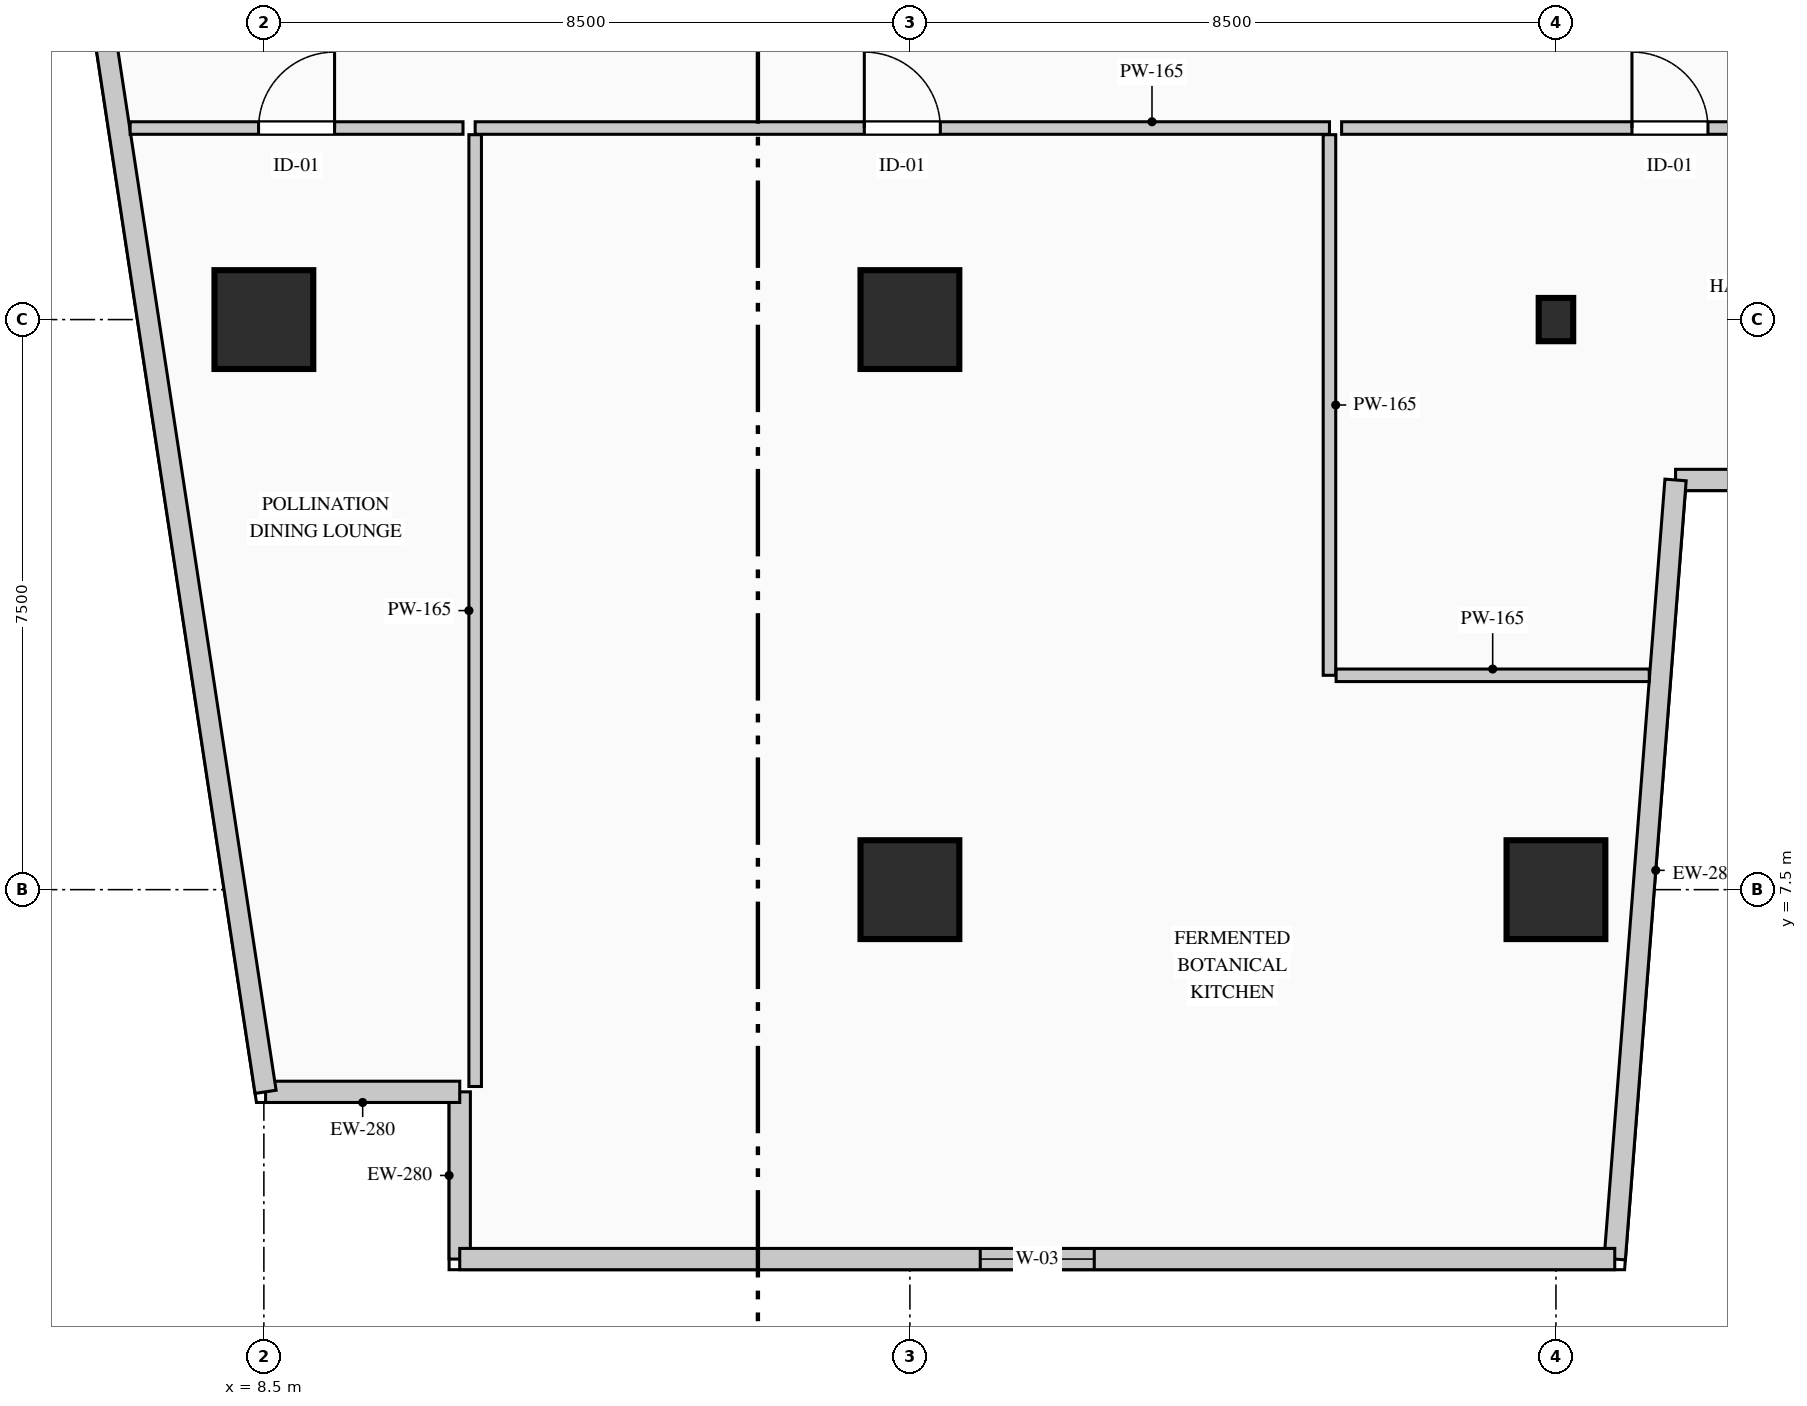
"""IFC4 building model, lengths in metres.
Left out: names, types, materials, properties, quantities, classifications, styles, units other than length and angle.
Written with IfcOpenShell. Run it as: python <this file> out.ifc"""

import sys

from ifc_helpers import new_model, si_unit, direction, frame, frame_2d, origin, origin_2d, place, context, subcontext, project, spatial, rectangle, i_section, extrude, element, fill, save


model = new_model("IFC4")
c1 = context("Model", 3, precision=1e-05, world=origin(), true_north=direction((0.0, 1.0)))
c2 = subcontext(c1, "Body", "Model", "MODEL_VIEW")
j1 = project(units=[si_unit("LENGTHUNIT", "METRE"), si_unit("PLANEANGLEUNIT", "RADIAN")], contexts=[c1])
p1 = place(None, origin())
s1 = spatial("IfcSite", under=j1, at=p1, CompositionType="ELEMENT")
p2 = place(p1, origin())
s2 = spatial("IfcBuilding", under=s1, at=p2, CompositionType="ELEMENT")
p3 = place(p2, frame((0.0, 0.0, 62.2)))
s3 = spatial("IfcBuildingStorey", under=s2, at=p3, CompositionType="ELEMENT", Elevation=62.2)
for number, where, z_axis, x_axis in (
    (1, (8.5, 15.0, 0.0), (0.0, 0.0, 1.0), (1.0, 0.0, 0.0)),
    (2, (17.0, 7.5, 0.0), (0.0, 0.0, 1.0), (1.0, 0.0, 0.0)),
    (3, (17.0, 15.0, 0.0), (0.0, 0.0, 1.0), (1.0, 0.0, 0.0)),
    (4, (25.5, 7.5, 0.0), (0.0, 0.0, 1.0), (1.0, 0.0, 0.0)),
):
    element("IfcColumn", number, at=place(p3, frame(where, z_axis=z_axis, x_axis=x_axis)), inside=s3, PredefinedType="COLUMN", context=c2, shape_type="SweptSolid", body=[
        extrude(rectangle(XDim=1.3, YDim=1.3, at=origin_2d()), origin(), (0.0, 0.0, 1.0), 4.4),
    ])
p4 = place(p3, frame((25.5, 15.0, 0.0), z_axis=(0.0, 0.0, 1.0), x_axis=(1.0, 0.0, 0.0)))
e5 = element("IfcColumn", 5, at=p4, inside=s3, PredefinedType="COLUMN", context=c2, shape_type="SweptSolid", body=[
    extrude(i_section(OverallWidth=0.454, OverallDepth=0.569, WebThickness=0.078, FlangeThickness=0.08, FilletRadius=0.015, at=origin_2d()), origin(), (0.0, 0.0, 1.0), 4.4),
])
p5 = place(p3, frame((11.077, 2.64, 0.0), z_axis=(0.0, 0.0, 1.0), x_axis=(0.0, 1.0, 0.0)))
e6 = element("IfcWall", 6, at=p5, inside=s3, PredefinedType="STANDARD", context=c2, shape_type="SweptSolid", body=[
    extrude(rectangle(XDim=2.2, YDim=0.28, at=frame_2d((1.1, 0.0))), origin(), (0.0, 0.0, 1.0), 4.1),
])
p6 = place(p3, frame((11.077, 4.84, 0.0), z_axis=(0.0, 0.0, 1.0), x_axis=(-1.0, 0.0, 0.0)))
e7 = element("IfcWall", 7, at=p6, inside=s3, PredefinedType="STANDARD", context=c2, shape_type="SweptSolid", body=[
    extrude(rectangle(XDim=2.554, YDim=0.28, at=frame_2d((1.277, 0.0))), origin(), (0.0, 0.0, 1.0), 4.1),
])
p7 = place(p3, frame((8.523, 4.84, 0.0), z_axis=(0.0, 0.0, 1.0), x_axis=(-0.150394554312, 0.988626055712, 0.0)))
e8 = element("IfcWall", 8, at=p7, inside=s3, PredefinedType="STANDARD", context=c2, shape_type="SweptSolid", body=[
    extrude(rectangle(XDim=36.738, YDim=0.28, at=frame_2d((18.369, 0.0))), origin(), (0.0, 0.0, 1.0), 4.1),
])
p8 = place(p7, frame((22.762, 0.0, 0.9)))
e9 = element("IfcOpeningElement", 9, at=p8, cuts=e8, PredefinedType="OPENING", context=c2, shape_type="SweptSolid", body=[
    extrude(rectangle(XDim=1.5, YDim=1.8, at=frame_2d((0.75, 0.9))), frame((0.0, 0.15, 0.0), z_axis=(0.0, -1.0, 0.0), x_axis=(1.0, 0.0, 0.0)), (0.0, 0.0, 1.0), 0.3),
])
p9 = place(p3, frame((35.77, 12.89, 0.0), z_axis=(0.0, 0.0, 1.0), x_axis=(-1.0, 0.0, 0.0)))
e10 = element("IfcWall", 10, at=p9, inside=s3, PredefinedType="STANDARD", context=c2, shape_type="SweptSolid", body=[
    extrude(rectangle(XDim=8.697, YDim=0.28, at=frame_2d((4.348, 0.0))), origin(), (0.0, 0.0, 1.0), 4.1),
])
p10 = place(p9, frame((5.511, 0.0, 0.9)))
e11 = element("IfcOpeningElement", 11, at=p10, cuts=e10, PredefinedType="OPENING", context=c2, shape_type="SweptSolid", body=[
    extrude(rectangle(XDim=1.5, YDim=1.8, at=frame_2d((0.75, 0.9))), frame((0.0, 0.15, 0.0), z_axis=(0.0, -1.0, 0.0), x_axis=(1.0, 0.0, 0.0)), (0.0, 0.0, 1.0), 0.3),
])
p11 = place(p3, frame((27.073, 12.89, 0.0), z_axis=(0.0, 0.0, 1.0), x_axis=(-0.077816860153, -0.996967670627, 0.0)))
e12 = element("IfcWall", 12, at=p11, inside=s3, PredefinedType="STANDARD", context=c2, shape_type="SweptSolid", body=[
    extrude(rectangle(XDim=10.281, YDim=0.28, at=frame_2d((5.141, 0.0))), origin(), (0.0, 0.0, 1.0), 4.1),
])
p12 = place(p3, frame((26.273, 2.64, 0.0), z_axis=(0.0, 0.0, 1.0), x_axis=(-1.0, 0.0, 0.0)))
e13 = element("IfcWall", 13, at=p12, inside=s3, PredefinedType="STANDARD", context=c2, shape_type="SweptSolid", body=[
    extrude(rectangle(XDim=15.197, YDim=0.28, at=frame_2d((7.598, 0.0))), origin(), (0.0, 0.0, 1.0), 4.1),
])
p13 = place(p12, frame((6.848, 0.0, 0.9)))
e14 = element("IfcOpeningElement", 14, at=p13, cuts=e13, PredefinedType="OPENING", context=c2, shape_type="SweptSolid", body=[
    extrude(rectangle(XDim=1.5, YDim=1.8, at=frame_2d((0.75, 0.9))), frame((0.0, 0.15, 0.0), z_axis=(0.0, -1.0, 0.0), x_axis=(1.0, 0.0, 0.0)), (0.0, 0.0, 1.0), 0.3),
])
p14 = place(p3, frame((11.28, 17.52, 0.0), z_axis=(0.0, 0.0, 1.0), x_axis=(1.0, 0.0, 0.0)))
e15 = element("IfcWall", 15, at=p14, inside=s3, PredefinedType="PARTITIONING", context=c2, shape_type="SweptSolid", body=[
    extrude(rectangle(XDim=11.24, YDim=0.165, at=frame_2d((5.62, 0.0))), origin(), (0.0, 0.0, 1.0), 4.1),
])
p15 = place(p14, frame((5.12, 0.0, 0.0)))
e16 = element("IfcOpeningElement", 16, at=p15, cuts=e15, PredefinedType="OPENING", context=c2, shape_type="SweptSolid", body=[
    extrude(rectangle(XDim=1.0, YDim=2.15, at=frame_2d((0.5, 1.075))), frame((0.0, 0.093, 0.0), z_axis=(0.0, -1.0, 0.0), x_axis=(1.0, 0.0, 0.0)), (0.0, 0.0, 1.0), 0.185),
])
p16 = place(p3, frame((22.52, 17.433, 0.0), z_axis=(0.0, 0.0, 1.0), x_axis=(0.0, -1.0, 0.0)))
e17 = element("IfcWall", 17, at=p16, inside=s3, PredefinedType="PARTITIONING", context=c2, shape_type="SweptSolid", body=[
    extrude(rectangle(XDim=7.113, YDim=0.165, at=frame_2d((3.556, 0.0))), origin(), (0.0, 0.0, 1.0), 3.685),
])
p17 = place(p3, frame((22.607, 10.32, 0.0), z_axis=(0.0, 0.0, 1.0), x_axis=(1.0, 0.0, 0.0)))
e18 = element("IfcWall", 18, at=p17, inside=s3, PredefinedType="PARTITIONING", context=c2, shape_type="SweptSolid", body=[
    extrude(rectangle(XDim=4.12, YDim=0.165, at=frame_2d((2.06, 0.0))), origin(), (0.0, 0.0, 1.0), 4.1),
])
p18 = place(p3, frame((11.28, 4.91, 0.0), z_axis=(0.0, 0.0, 1.0), x_axis=(0.0, 1.0, 0.0)))
e19 = element("IfcWall", 19, at=p18, inside=s3, PredefinedType="PARTITIONING", context=c2, shape_type="SweptSolid", body=[
    extrude(rectangle(XDim=12.522, YDim=0.165, at=frame_2d((6.261, 0.0))), origin(), (0.0, 0.0, 1.0), 4.1),
])
p19 = place(p3, frame((6.74, 17.52, 0.0), z_axis=(0.0, 0.0, 1.0), x_axis=(1.0, 0.0, 0.0)))
e20 = element("IfcWall", 20, at=p19, inside=s3, PredefinedType="PARTITIONING", context=c2, shape_type="SweptSolid", body=[
    extrude(rectangle(XDim=4.38, YDim=0.165, at=frame_2d((2.19, 0.0))), origin(), (0.0, 0.0, 1.0), 4.1),
])
p20 = place(p19, frame((1.69, 0.0, 0.0)))
e21 = element("IfcOpeningElement", 21, at=p20, cuts=e20, PredefinedType="OPENING", context=c2, shape_type="SweptSolid", body=[
    extrude(rectangle(XDim=1.0, YDim=2.15, at=frame_2d((0.5, 1.075))), frame((0.0, 0.093, 0.0), z_axis=(0.0, -1.0, 0.0), x_axis=(1.0, 0.0, 0.0)), (0.0, 0.0, 1.0), 0.185),
])
p21 = place(p3, frame((22.68, 17.52, 0.0), z_axis=(0.0, 0.0, 1.0), x_axis=(1.0, 0.0, 0.0)))
e22 = element("IfcWall", 22, at=p21, inside=s3, PredefinedType="PARTITIONING", context=c2, shape_type="SweptSolid", body=[
    extrude(rectangle(XDim=8.64, YDim=0.165, at=frame_2d((4.32, 0.0))), origin(), (0.0, 0.0, 1.0), 3.685),
])
p22 = place(p21, frame((3.82, 0.0, 0.0)))
e23 = element("IfcOpeningElement", 23, at=p22, cuts=e22, PredefinedType="OPENING", context=c2, shape_type="SweptSolid", body=[
    extrude(rectangle(XDim=1.0, YDim=2.15, at=frame_2d((0.5, 1.075))), frame((0.0, 0.093, 0.0), z_axis=(0.0, -1.0, 0.0), x_axis=(1.0, 0.0, 0.0)), (0.0, 0.0, 1.0), 0.185),
])
p23 = place(p13, origin())
e24 = element("IfcWindow", 24, at=p23, inside=s3, PartitioningType="SINGLE_PANEL", PredefinedType="WINDOW", context=c2, shape_type="SweptSolid", body=[
    extrude(rectangle(XDim=1.5, YDim=1.8, at=frame_2d((0.75, 0.9))), frame((0.0, 0.03, 0.0), z_axis=(0.0, -1.0, 0.0), x_axis=(1.0, 0.0, 0.0)), (0.0, 0.0, 1.0), 0.06),
])
fill(e14, e24)
p24 = place(p15, origin())
e25 = element("IfcDoor", 25, at=p24, inside=s3, OperationType="SINGLE_SWING_LEFT", PredefinedType="DOOR", context=c2, shape_type="SweptSolid", body=[
    extrude(rectangle(XDim=1.0, YDim=2.15, at=frame_2d((0.5, 1.075))), frame((0.0, 0.025, 0.0), z_axis=(0.0, -1.0, 0.0), x_axis=(1.0, 0.0, 0.0)), (0.0, 0.0, 1.0), 0.05),
])
fill(e16, e25)
p25 = place(p20, origin())
e26 = element("IfcDoor", 26, at=p25, inside=s3, OperationType="SINGLE_SWING_RIGHT", PredefinedType="DOOR", context=c2, shape_type="SweptSolid", body=[
    extrude(rectangle(XDim=1.0, YDim=2.15, at=frame_2d((0.5, 1.075))), frame((0.0, 0.025, 0.0), z_axis=(0.0, -1.0, 0.0), x_axis=(1.0, 0.0, 0.0)), (0.0, 0.0, 1.0), 0.05),
])
fill(e21, e26)
p26 = place(p22, origin())
e27 = element("IfcDoor", 27, at=p26, inside=s3, OperationType="SINGLE_SWING_LEFT", PredefinedType="DOOR", context=c2, shape_type="SweptSolid", body=[
    extrude(rectangle(XDim=1.0, YDim=2.15, at=frame_2d((0.5, 1.075))), frame((0.0, 0.025, 0.0), z_axis=(0.0, -1.0, 0.0), x_axis=(1.0, 0.0, 0.0)), (0.0, 0.0, 1.0), 0.05),
])
fill(e23, e27)
save(model, sys.argv[1])
